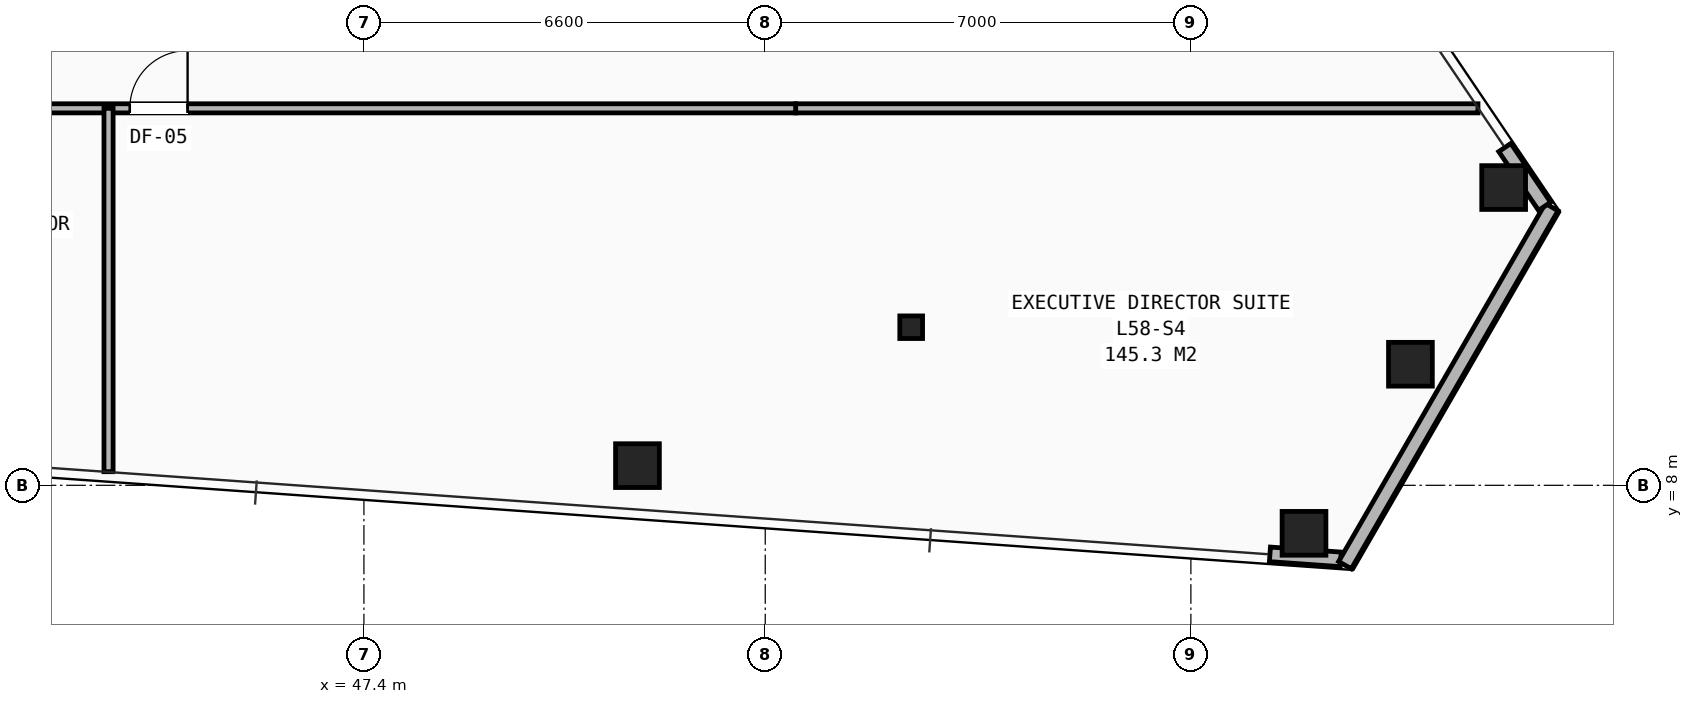
"""IFC4 building model, lengths in metres.
Left out: names, types, materials, properties, quantities, classifications, styles, units other than length and angle.
Written with IfcOpenShell. Run it as: python <this file> out.ifc"""

import sys

from ifc_helpers import new_model, si_unit, direction, frame, frame_2d, origin, origin_2d, place, context, subcontext, project, spatial, rectangle, hollow_rectangle, i_section, extrude, element, fill, save


model = new_model("IFC4")
c1 = context("Model", 3, precision=1e-05, world=origin(), true_north=direction((0.0, 1.0)))
c2 = subcontext(c1, "Body", "Model", "MODEL_VIEW")
j1 = project(units=[si_unit("LENGTHUNIT", "METRE"), si_unit("PLANEANGLEUNIT", "RADIAN")], contexts=[c1])
p1 = place(None, origin())
s1 = spatial("IfcSite", under=j1, at=p1, CompositionType="ELEMENT")
p2 = place(p1, origin())
s2 = spatial("IfcBuilding", under=s1, at=p2, CompositionType="ELEMENT")
p3 = place(p2, frame((0.0, 0.0, 204.9)))
s3 = spatial("IfcBuildingStorey", under=s2, at=p3, CompositionType="ELEMENT", Elevation=204.9)
p4 = place(p3, frame((56.4, 10.6, 0.0), z_axis=(0.0, 0.0, 1.0), x_axis=(1.0, 0.0, 0.0)))
e1 = element("IfcColumn", 1, at=p4, inside=s3, PredefinedType="COLUMN", context=c2, shape_type="SweptSolid", body=[
    extrude(i_section(OverallWidth=0.374, OverallDepth=0.372, WebThickness=0.016, FlangeThickness=0.026, at=origin_2d()), origin(), (0.0, 0.0, 1.0), 3.5),
])
for number, where, z_axis, x_axis in (
    (2, (51.898, 8.323, 0.0), (0.0, 0.0, 1.0), (1.0, 0.0, 0.0)),
    (3, (62.86, 7.21, 0.0), (0.0, 0.0, 1.0), (1.0, 0.0, 0.0)),
    (4, (64.611, 9.991, 0.0), (0.0, 0.0, 1.0), (1.0, 0.0, 0.0)),
    (5, (66.144, 12.897, 0.0), (0.0, 0.0, 1.0), (1.0, 0.0, 0.0)),
):
    element("IfcColumn", number, at=place(p3, frame(where, z_axis=z_axis, x_axis=x_axis)), inside=s3, PredefinedType="COLUMN", context=c2, shape_type="SweptSolid", body=[
        extrude(hollow_rectangle(XDim=0.72, YDim=0.72, WallThickness=0.05, at=origin_2d()), origin(), (0.0, 0.0, 1.0), 3.5),
    ])
p5 = place(p3, frame((62.3, 6.865, 0.0), z_axis=(0.0, 0.0, 1.0), x_axis=(0.997485162718, -0.070875596345, 0.0)))
e6 = element("IfcWall", 6, at=p5, inside=s3, PredefinedType="SHEAR", context=c2, shape_type="SweptSolid", body=[
    extrude(rectangle(XDim=1.168, YDim=0.24, at=frame_2d((0.584, 0.0))), origin(), (0.0, 0.0, 1.0), 2.623),
])
p6 = place(p3, frame((66.934, 12.576, 0.0), z_axis=(0.0, 0.0, 1.0), x_axis=(-0.500004222222, -0.866022966069, 0.0)))
e7 = element("IfcWall", 7, at=p6, inside=s3, PredefinedType="SHEAR", context=c2, shape_type="SweptSolid", body=[
    extrude(rectangle(XDim=6.8, YDim=0.24, at=frame_2d((3.4, 0.0))), origin(), (0.0, 0.0, 1.0), 2.623),
])
p7 = place(p3, frame((66.817, 12.588, 0.0), z_axis=(0.0, 0.0, 1.0), x_axis=(-0.559997089768, 0.828494574183, 0.0)))
e8 = element("IfcWall", 8, at=p7, inside=s3, PredefinedType="SHEAR", context=c2, shape_type="SweptSolid", body=[
    extrude(rectangle(XDim=1.167, YDim=0.24, at=frame_2d((0.584, 0.0))), origin(), (0.0, 0.0, 1.0), 2.623),
])
p8 = place(p3, frame((54.5, 14.2, 0.0), z_axis=(0.0, 0.0, 1.0), x_axis=(1.0, 0.0, 0.0)))
e9 = element("IfcWall", 9, at=p8, inside=s3, PredefinedType="PARTITIONING", context=c2, shape_type="SweptSolid", body=[
    extrude(rectangle(XDim=11.221, YDim=0.15, at=frame_2d((5.611, 0.0))), origin(), (0.0, 0.0, 1.0), 2.292),
])
p9 = place(p3, frame((25.5, 14.2, 0.0), z_axis=(0.0, 0.0, 1.0), x_axis=(1.0, 0.0, 0.0)))
e10 = element("IfcWall", 10, at=p9, inside=s3, PredefinedType="PARTITIONING", context=c2, shape_type="SweptSolid", body=[
    extrude(rectangle(XDim=29.0, YDim=0.15, at=frame_2d((14.5, 0.0))), origin(), (0.0, 0.0, 1.0), 2.292),
])
p10 = place(p9, frame((0.85, 0.0, 0.0)))
e11 = element("IfcOpeningElement", 11, at=p10, cuts=e10, PredefinedType="OPENING", context=c2, shape_type="SweptSolid", body=[
    extrude(rectangle(XDim=0.95, YDim=2.1, at=frame_2d((0.475, 1.05))), frame((0.0, 0.085, 0.0), z_axis=(0.0, -1.0, 0.0), x_axis=(1.0, 0.0, 0.0)), (0.0, 0.0, 1.0), 0.17),
])
p11 = place(p9, frame((8.25, 0.0, 0.0)))
e12 = element("IfcOpeningElement", 12, at=p11, cuts=e10, PredefinedType="OPENING", context=c2, shape_type="SweptSolid", body=[
    extrude(rectangle(XDim=0.95, YDim=2.1, at=frame_2d((0.475, 1.05))), frame((0.0, 0.085, 0.0), z_axis=(0.0, -1.0, 0.0), x_axis=(1.0, 0.0, 0.0)), (0.0, 0.0, 1.0), 0.17),
])
p12 = place(p9, frame((13.05, 0.0, 0.0)))
e13 = element("IfcOpeningElement", 13, at=p12, cuts=e10, PredefinedType="OPENING", context=c2, shape_type="SweptSolid", body=[
    extrude(rectangle(XDim=0.95, YDim=2.1, at=frame_2d((0.475, 1.05))), frame((0.0, 0.085, 0.0), z_axis=(0.0, -1.0, 0.0), x_axis=(1.0, 0.0, 0.0)), (0.0, 0.0, 1.0), 0.17),
])
p13 = place(p9, frame((18.05, 0.0, 0.0)))
e14 = element("IfcOpeningElement", 14, at=p13, cuts=e10, PredefinedType="OPENING", context=c2, shape_type="SweptSolid", body=[
    extrude(rectangle(XDim=0.95, YDim=2.1, at=frame_2d((0.475, 1.05))), frame((0.0, 0.085, 0.0), z_axis=(0.0, -1.0, 0.0), x_axis=(1.0, 0.0, 0.0)), (0.0, 0.0, 1.0), 0.17),
])
p14 = place(p3, frame((43.2, 8.224, 0.0), z_axis=(0.0, 0.0, 1.0), x_axis=(0.0, 1.0, 0.0)))
e15 = element("IfcWall", 15, at=p14, inside=s3, PredefinedType="PARTITIONING", context=c2, shape_type="SweptSolid", body=[
    extrude(rectangle(XDim=5.976, YDim=0.15, at=frame_2d((2.988, 0.0))), origin(), (0.0, 0.0, 1.0), 2.628),
])
p15 = place(p13, origin())
e16 = element("IfcDoor", 16, at=p15, inside=s3, OperationType="SINGLE_SWING_RIGHT", PredefinedType="DOOR", context=c2, shape_type="SweptSolid", body=[
    extrude(rectangle(XDim=0.95, YDim=2.1, at=frame_2d((0.475, 1.05))), frame((0.0, 0.025, 0.0), z_axis=(0.0, -1.0, 0.0), x_axis=(1.0, 0.0, 0.0)), (0.0, 0.0, 1.0), 0.05),
])
fill(e14, e16)
save(model, sys.argv[1])
